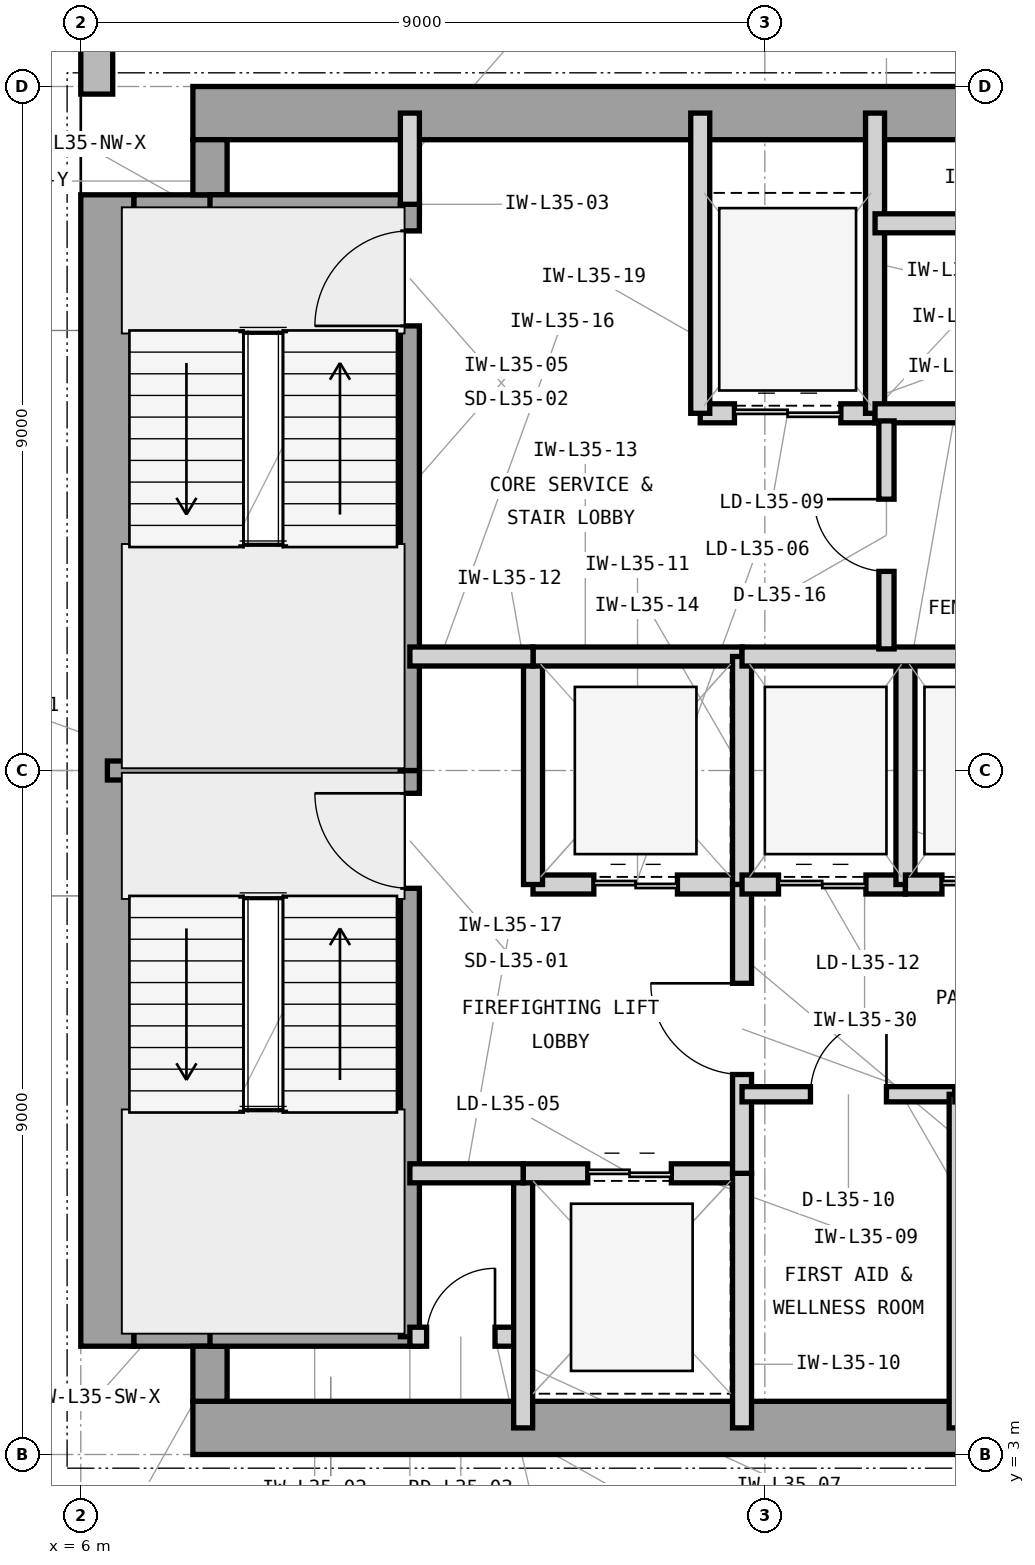
"""IFC4 building model, lengths in metres.
Left out: names, types, materials, properties, quantities, classifications, styles, units other than length and angle.
Written with IfcOpenShell. Run it as: python <this file> out.ifc"""

import sys

from ifc_helpers import new_model, si_unit, direction, frame, frame_2d, origin, place, context, subcontext, project, spatial, rectangle, extrude, element, fill, save


model = new_model("IFC4")
c1 = context("Model", 3, precision=1e-05, world=origin(), true_north=direction((0.0, 1.0)))
c2 = subcontext(c1, "Body", "Model", "MODEL_VIEW")
j1 = project(units=[si_unit("LENGTHUNIT", "METRE"), si_unit("PLANEANGLEUNIT", "RADIAN")], contexts=[c1])
p1 = place(None, origin())
s1 = spatial("IfcSite", under=j1, at=p1, CompositionType="ELEMENT")
p2 = place(p1, origin())
s2 = spatial("IfcBuilding", under=s1, at=p2, CompositionType="ELEMENT")
p3 = place(p2, frame((0.0, 0.0, 147.9)))
s3 = spatial("IfcBuildingStorey", under=s2, at=p3, CompositionType="ELEMENT", Elevation=147.9)
p4 = place(p3, frame((7.475, 3.35, 0.0), z_axis=(0.0, 0.0, 1.0), x_axis=(1.0, 0.0, 0.0)))
e1 = element("IfcWall", 1, at=p4, inside=s3, PredefinedType="SHEAR", context=c2, shape_type="SweptSolid", body=[
    extrude(rectangle(XDim=16.525, YDim=0.7, at=frame_2d((8.262, 0.0))), origin(), (0.0, 0.0, 1.0), 3.9),
])
p5 = place(p3, frame((6.35, 4.425, 0.0), z_axis=(0.0, 0.0, 1.0), x_axis=(0.0, 1.0, 0.0)))
e2 = element("IfcWall", 2, at=p5, inside=s3, PredefinedType="SHEAR", context=c2, shape_type="SweptSolid", body=[
    extrude(rectangle(XDim=15.15, YDim=0.7, at=frame_2d((7.575, 0.0))), origin(), (0.0, 0.0, 1.0), 3.9),
])
p6 = place(p3, frame((7.475, 20.65, 0.0), z_axis=(0.0, 0.0, 1.0), x_axis=(1.0, 0.0, 0.0)))
e3 = element("IfcWall", 3, at=p6, inside=s3, PredefinedType="SHEAR", context=c2, shape_type="SweptSolid", body=[
    extrude(rectangle(XDim=12.325, YDim=0.7, at=frame_2d((6.163, 0.0))), origin(), (0.0, 0.0, 1.0), 3.9),
])
p7 = place(p3, frame((6.7, 4.65, 0.0), z_axis=(0.0, 0.0, 1.0), x_axis=(1.0, 0.0, 0.0)))
e4 = element("IfcWall", 4, at=p7, inside=s3, PredefinedType="SHEAR", context=c2, shape_type="SweptSolid", body=[
    extrude(rectangle(XDim=1.225, YDim=0.45, at=frame_2d((0.613, 0.0))), origin(), (0.0, 0.0, 1.0), 3.9),
])
p8 = place(p3, frame((7.7, 3.7, 0.0), z_axis=(0.0, 0.0, 1.0), x_axis=(0.0, 1.0, 0.0)))
e5 = element("IfcWall", 5, at=p8, inside=s3, PredefinedType="SHEAR", context=c2, shape_type="SweptSolid", body=[
    extrude(rectangle(XDim=0.725, YDim=0.45, at=frame_2d((0.363, 0.0))), origin(), (0.0, 0.0, 1.0), 3.9),
])
p9 = place(p3, frame((6.7, 19.35, 0.0), z_axis=(0.0, 0.0, 1.0), x_axis=(1.0, 0.0, 0.0)))
e6 = element("IfcWall", 6, at=p9, inside=s3, PredefinedType="SHEAR", context=c2, shape_type="SweptSolid", body=[
    extrude(rectangle(XDim=1.225, YDim=0.45, at=frame_2d((0.613, 0.0))), origin(), (0.0, 0.0, 1.0), 3.9),
])
p10 = place(p3, frame((7.7, 19.575, 0.0), z_axis=(0.0, 0.0, 1.0), x_axis=(0.0, 1.0, 0.0)))
e7 = element("IfcWall", 7, at=p10, inside=s3, PredefinedType="SHEAR", context=c2, shape_type="SweptSolid", body=[
    extrude(rectangle(XDim=0.725, YDim=0.45, at=frame_2d((0.363, 0.0))), origin(), (0.0, 0.0, 1.0), 3.9),
])
p11 = place(p3, frame((6.21, 46.4, 0.0), z_axis=(0.0, 0.0, 1.0), x_axis=(0.0, -1.0, 0.0)))
e8 = element("IfcWall", 8, at=p11, inside=s3, PredefinedType="STANDARD", context=c2, shape_type="SweptSolid", body=[
    extrude(rectangle(XDim=25.5, YDim=0.42, at=frame_2d((12.75, 0.0))), origin(), (0.0, 0.0, 1.0), 3.7),
])
p12 = place(p11, frame((11.5, 0.0, 0.85)))
e9 = element("IfcOpeningElement", 9, at=p12, cuts=e8, PredefinedType="OPENING", context=c2, shape_type="SweptSolid", body=[
    extrude(rectangle(XDim=2.5, YDim=2.25, at=frame_2d((1.25, 1.125))), frame((0.0, 0.22, 0.0), z_axis=(0.0, -1.0, 0.0), x_axis=(1.0, 0.0, 0.0)), (0.0, 0.0, 1.0), 0.44),
])
p13 = place(p3, frame((6.35, 12.0, 0.0), z_axis=(0.0, 0.0, 1.0), x_axis=(1.0, 0.0, 0.0)))
e10 = element("IfcWall", 10, at=p13, inside=s3, PredefinedType="SHEAR", context=c2, shape_type="SweptSolid", body=[
    extrude(rectangle(XDim=4.105, YDim=0.25, at=frame_2d((2.052, 0.0))), origin(), (0.0, 0.0, 1.0), 3.9),
])
for number, where, z_axis, x_axis in (
    (11, (7.7, 4.55, 0.0), (0.0, 0.0, 1.0), (1.0, 0.0, 0.0)),
    (12, (7.7, 19.45, 0.0), (0.0, 0.0, 1.0), (1.0, 0.0, 0.0)),
):
    element("IfcWall", number, at=place(p3, frame(where, z_axis=z_axis, x_axis=x_axis)), inside=s3, PredefinedType="SHEAR", context=c2, shape_type="SweptSolid", body=[
        extrude(rectangle(XDim=2.755, YDim=0.25, at=frame_2d((1.377, 0.0))), origin(), (0.0, 0.0, 1.0), 3.9),
    ])
p14 = place(p3, frame((10.33, 4.55, 0.0), z_axis=(0.0, 0.0, 1.0), x_axis=(0.0, 1.0, 0.0)))
e13 = element("IfcWall", 13, at=p14, inside=s3, PredefinedType="SHEAR", context=c2, shape_type="SweptSolid", body=[
    extrude(rectangle(XDim=7.45, YDim=0.25, at=frame_2d((3.725, 0.0))), origin(), (0.0, 0.0, 1.0), 3.9),
])
p15 = place(p14, frame((5.9, 0.0, 0.0)))
e14 = element("IfcOpeningElement", 14, at=p15, cuts=e13, PredefinedType="OPENING", context=c2, shape_type="SweptSolid", body=[
    extrude(rectangle(XDim=1.25, YDim=2.2, at=frame_2d((0.625, 1.1))), frame((0.0, 0.135, 0.0), z_axis=(0.0, -1.0, 0.0), x_axis=(1.0, 0.0, 0.0)), (0.0, 0.0, 1.0), 0.27),
])
p16 = place(p3, frame((10.33, 12.0, 0.0), z_axis=(0.0, 0.0, 1.0), x_axis=(0.0, 1.0, 0.0)))
e15 = element("IfcWall", 15, at=p16, inside=s3, PredefinedType="SHEAR", context=c2, shape_type="SweptSolid", body=[
    extrude(rectangle(XDim=7.45, YDim=0.25, at=frame_2d((3.725, 0.0))), origin(), (0.0, 0.0, 1.0), 3.9),
])
p17 = place(p16, frame((5.85, 0.0, 0.0)))
e16 = element("IfcOpeningElement", 16, at=p17, cuts=e15, PredefinedType="OPENING", context=c2, shape_type="SweptSolid", body=[
    extrude(rectangle(XDim=1.25, YDim=2.2, at=frame_2d((0.625, 1.1))), frame((0.0, 0.135, 0.0), z_axis=(0.0, -1.0, 0.0), x_axis=(1.0, 0.0, 0.0)), (0.0, 0.0, 1.0), 0.27),
])
p18 = place(p3, frame((10.33, 4.55, 0.0), z_axis=(0.0, 0.0, 1.0), x_axis=(1.0, 0.0, 0.0)))
e17 = element("IfcWall", 17, at=p18, inside=s3, PredefinedType="PARTITIONING", context=c2, shape_type="SweptSolid", body=[
    extrude(rectangle(XDim=1.49, YDim=0.25, at=frame_2d((0.745, 0.0))), origin(), (0.0, 0.0, 1.0), 3.69),
])
p19 = place(p18, frame((0.22, 0.0, 0.0)))
e18 = element("IfcOpeningElement", 18, at=p19, cuts=e17, PredefinedType="OPENING", context=c2, shape_type="SweptSolid", body=[
    extrude(rectangle(XDim=0.9, YDim=2.1, at=frame_2d((0.45, 1.05))), frame((0.0, 0.135, 0.0), z_axis=(0.0, -1.0, 0.0), x_axis=(1.0, 0.0, 0.0)), (0.0, 0.0, 1.0), 0.27),
])
p20 = place(p3, frame((11.82, 3.35, 0.0), z_axis=(0.0, 0.0, 1.0), x_axis=(0.0, 1.0, 0.0)))
e19 = element("IfcWall", 19, at=p20, inside=s3, PredefinedType="PARTITIONING", context=c2, shape_type="SweptSolid", body=[
    extrude(rectangle(XDim=3.35, YDim=0.25, at=frame_2d((1.675, 0.0))), origin(), (0.0, 0.0, 1.0), 3.69),
])
p21 = place(p3, frame((10.33, 19.45, 0.0), z_axis=(0.0, 0.0, 1.0), x_axis=(0.0, 1.0, 0.0)))
e20 = element("IfcWall", 20, at=p21, inside=s3, PredefinedType="PARTITIONING", context=c2, shape_type="SweptSolid", body=[
    extrude(rectangle(XDim=1.2, YDim=0.25, at=frame_2d((0.6, 0.0))), origin(), (0.0, 0.0, 1.0), 2.994),
])
p22 = place(p3, frame((11.82, 6.7, 0.0), z_axis=(0.0, 0.0, 1.0), x_axis=(1.0, 0.0, 0.0)))
e21 = element("IfcWall", 21, at=p22, inside=s3, PredefinedType="PARTITIONING", context=c2, shape_type="SweptSolid", body=[
    extrude(rectangle(XDim=2.88, YDim=0.25, at=frame_2d((1.44, 0.0))), origin(), (0.0, 0.0, 1.0), 3.233),
])
p23 = place(p22, frame((0.85, 0.0, 0.0)))
e22 = element("IfcOpeningElement", 22, at=p23, cuts=e21, PredefinedType="OPENING", context=c2, shape_type="SweptSolid", body=[
    extrude(rectangle(XDim=1.1, YDim=2.25, at=frame_2d((0.55, 1.125))), frame((0.0, 0.135, 0.0), z_axis=(0.0, -1.0, 0.0), x_axis=(1.0, 0.0, 0.0)), (0.0, 0.0, 1.0), 0.27),
])
p24 = place(p3, frame((14.7, 3.35, 0.0), z_axis=(0.0, 0.0, 1.0), x_axis=(0.0, 1.0, 0.0)))
e23 = element("IfcWall", 23, at=p24, inside=s3, PredefinedType="PARTITIONING", context=c2, shape_type="SweptSolid", body=[
    extrude(rectangle(XDim=3.35, YDim=0.25, at=frame_2d((1.675, 0.0))), origin(), (0.0, 0.0, 1.0), 3.69),
])
p25 = place(p3, frame((11.95, 10.5, 0.0), z_axis=(0.0, 0.0, 1.0), x_axis=(1.0, 0.0, 0.0)))
e24 = element("IfcWall", 24, at=p25, inside=s3, PredefinedType="PARTITIONING", context=c2, shape_type="SweptSolid", body=[
    extrude(rectangle(XDim=2.75, YDim=0.25, at=frame_2d((1.375, 0.0))), origin(), (0.0, 0.0, 1.0), 3.233),
])
p26 = place(p25, frame((0.8, 0.0, 0.0)))
e25 = element("IfcOpeningElement", 25, at=p26, cuts=e24, PredefinedType="OPENING", context=c2, shape_type="SweptSolid", body=[
    extrude(rectangle(XDim=1.1, YDim=2.25, at=frame_2d((0.55, 1.125))), frame((0.0, 0.135, 0.0), z_axis=(0.0, -1.0, 0.0), x_axis=(1.0, 0.0, 0.0)), (0.0, 0.0, 1.0), 0.27),
])
p27 = place(p3, frame((11.95, 10.5, 0.0), z_axis=(0.0, 0.0, 1.0), x_axis=(0.0, 1.0, 0.0)))
e26 = element("IfcWall", 26, at=p27, inside=s3, PredefinedType="PARTITIONING", context=c2, shape_type="SweptSolid", body=[
    extrude(rectangle(XDim=3.0, YDim=0.25, at=frame_2d((1.5, 0.0))), origin(), (0.0, 0.0, 1.0), 3.69),
])
p28 = place(p3, frame((11.95, 13.5, 0.0), z_axis=(0.0, 0.0, 1.0), x_axis=(1.0, 0.0, 0.0)))
e27 = element("IfcWall", 27, at=p28, inside=s3, PredefinedType="PARTITIONING", context=c2, shape_type="SweptSolid", body=[
    extrude(rectangle(XDim=2.75, YDim=0.25, at=frame_2d((1.375, 0.0))), origin(), (0.0, 0.0, 1.0), 3.233),
])
p29 = place(p3, frame((14.7, 10.5, 0.0), z_axis=(0.0, 0.0, 1.0), x_axis=(0.0, 1.0, 0.0)))
e28 = element("IfcWall", 28, at=p29, inside=s3, PredefinedType="PARTITIONING", context=c2, shape_type="SweptSolid", body=[
    extrude(rectangle(XDim=3.0, YDim=0.25, at=frame_2d((1.5, 0.0))), origin(), (0.0, 0.0, 1.0), 3.69),
])
p30 = place(p3, frame((14.7, 6.7, 0.0), z_axis=(0.0, 0.0, 1.0), x_axis=(0.0, 1.0, 0.0)))
e29 = element("IfcWall", 29, at=p30, inside=s3, PredefinedType="PARTITIONING", context=c2, shape_type="SweptSolid", body=[
    extrude(rectangle(XDim=3.8, YDim=0.25, at=frame_2d((1.9, 0.0))), origin(), (0.0, 0.0, 1.0), 3.69),
])
p31 = place(p30, frame((1.3, 0.0, 0.0)))
e30 = element("IfcOpeningElement", 30, at=p31, cuts=e29, PredefinedType="OPENING", context=c2, shape_type="SweptSolid", body=[
    extrude(rectangle(XDim=1.2, YDim=2.2, at=frame_2d((0.6, 1.1))), frame((0.0, 0.135, 0.0), z_axis=(0.0, -1.0, 0.0), x_axis=(1.0, 0.0, 0.0)), (0.0, 0.0, 1.0), 0.27),
])
p32 = place(p3, frame((10.33, 13.5, 0.0), z_axis=(0.0, 0.0, 1.0), x_axis=(1.0, 0.0, 0.0)))
e31 = element("IfcWall", 31, at=p32, inside=s3, PredefinedType="PARTITIONING", context=c2, shape_type="SweptSolid", body=[
    extrude(rectangle(XDim=1.62, YDim=0.25, at=frame_2d((0.81, 0.0))), origin(), (0.0, 0.0, 1.0), 3.233),
])
p33 = place(p3, frame((10.33, 6.7, 0.0), z_axis=(0.0, 0.0, 1.0), x_axis=(1.0, 0.0, 0.0)))
e32 = element("IfcWall", 32, at=p33, inside=s3, PredefinedType="PARTITIONING", context=c2, shape_type="SweptSolid", body=[
    extrude(rectangle(XDim=1.49, YDim=0.25, at=frame_2d((0.745, 0.0))), origin(), (0.0, 0.0, 1.0), 3.233),
])
p34 = place(p3, frame((14.15, 16.7, 0.0), z_axis=(0.0, 0.0, 1.0), x_axis=(1.0, 0.0, 0.0)))
e33 = element("IfcWall", 33, at=p34, inside=s3, PredefinedType="PARTITIONING", context=c2, shape_type="SweptSolid", body=[
    extrude(rectangle(XDim=2.3, YDim=0.25, at=frame_2d((1.15, 0.0))), origin(), (0.0, 0.0, 1.0), 3.233),
])
p35 = place(p34, frame((0.45, 0.0, 0.0)))
e34 = element("IfcOpeningElement", 34, at=p35, cuts=e33, PredefinedType="OPENING", context=c2, shape_type="SweptSolid", body=[
    extrude(rectangle(XDim=1.4, YDim=2.35, at=frame_2d((0.7, 1.175))), frame((0.0, 0.135, 0.0), z_axis=(0.0, -1.0, 0.0), x_axis=(1.0, 0.0, 0.0)), (0.0, 0.0, 1.0), 0.27),
])
for number, where, z_axis, x_axis in (
    (35, (14.15, 16.7, 0.0), (0.0, 0.0, 1.0), (0.0, 1.0, 0.0)),
    (36, (16.45, 16.7, 0.0), (0.0, 0.0, 1.0), (0.0, 1.0, 0.0)),
):
    element("IfcWall", number, at=place(p3, frame(where, z_axis=z_axis, x_axis=x_axis)), inside=s3, PredefinedType="PARTITIONING", context=c2, shape_type="SweptSolid", body=[
        extrude(rectangle(XDim=3.95, YDim=0.25, at=frame_2d((1.975, 0.0))), origin(), (0.0, 0.0, 1.0), 3.69),
    ])
p36 = place(p3, frame((16.45, 16.7, 0.0), z_axis=(0.0, 0.0, 1.0), x_axis=(1.0, 0.0, 0.0)))
e37 = element("IfcWall", 37, at=p36, inside=s3, PredefinedType="PARTITIONING", context=c2, shape_type="SweptSolid", body=[
    extrude(rectangle(XDim=2.3, YDim=0.25, at=frame_2d((1.15, 0.0))), origin(), (0.0, 0.0, 1.0), 3.233),
])
p37 = place(p3, frame((16.45, 19.2, 0.0), z_axis=(0.0, 0.0, 1.0), x_axis=(1.0, 0.0, 0.0)))
e38 = element("IfcWall", 38, at=p37, inside=s3, PredefinedType="PARTITIONING", context=c2, shape_type="SweptSolid", body=[
    extrude(rectangle(XDim=7.2, YDim=0.25, at=frame_2d((3.6, 0.0))), origin(), (0.0, 0.0, 1.0), 3.69),
])
p38 = place(p3, frame((14.7, 7.74, 0.0), z_axis=(0.0, 0.0, 1.0), x_axis=(1.0, 0.0, 0.0)))
e39 = element("IfcWall", 39, at=p38, inside=s3, PredefinedType="PARTITIONING", context=c2, shape_type="SweptSolid", body=[
    extrude(rectangle(XDim=2.8, YDim=0.2, at=frame_2d((1.4, 0.0))), origin(), (0.0, 0.0, 1.0), 3.69),
])
p39 = place(p38, frame((0.9, 0.0, 0.0)))
e40 = element("IfcOpeningElement", 40, at=p39, cuts=e39, PredefinedType="OPENING", context=c2, shape_type="SweptSolid", body=[
    extrude(rectangle(XDim=1.0, YDim=2.15, at=frame_2d((0.5, 1.075))), frame((0.0, 0.11, 0.0), z_axis=(0.0, -1.0, 0.0), x_axis=(1.0, 0.0, 0.0)), (0.0, 0.0, 1.0), 0.22),
])
p40 = place(p3, frame((17.5, 3.35, 0.0), z_axis=(0.0, 0.0, 1.0), x_axis=(0.0, 1.0, 0.0)))
e41 = element("IfcWall", 41, at=p40, inside=s3, PredefinedType="PARTITIONING", context=c2, shape_type="SweptSolid", body=[
    extrude(rectangle(XDim=4.39, YDim=0.15, at=frame_2d((2.195, 0.0))), origin(), (0.0, 0.0, 1.0), 3.69),
])
p41 = place(p3, frame((14.7, 10.5, 0.0), z_axis=(0.0, 0.0, 1.0), x_axis=(1.0, 0.0, 0.0)))
e42 = element("IfcWall", 42, at=p41, inside=s3, PredefinedType="PARTITIONING", context=c2, shape_type="SweptSolid", body=[
    extrude(rectangle(XDim=2.15, YDim=0.25, at=frame_2d((1.075, 0.0))), origin(), (0.0, 0.0, 1.0), 3.233),
])
p42 = place(p41, frame((0.48, 0.0, 0.0)))
e43 = element("IfcOpeningElement", 43, at=p42, cuts=e42, PredefinedType="OPENING", context=c2, shape_type="SweptSolid", body=[
    extrude(rectangle(XDim=1.15, YDim=2.25, at=frame_2d((0.575, 1.125))), frame((0.0, 0.135, 0.0), z_axis=(0.0, -1.0, 0.0), x_axis=(1.0, 0.0, 0.0)), (0.0, 0.0, 1.0), 0.27),
])
p43 = place(p3, frame((16.85, 10.5, 0.0), z_axis=(0.0, 0.0, 1.0), x_axis=(0.0, 1.0, 0.0)))
e44 = element("IfcWall", 44, at=p43, inside=s3, PredefinedType="PARTITIONING", context=c2, shape_type="SweptSolid", body=[
    extrude(rectangle(XDim=3.0, YDim=0.25, at=frame_2d((1.5, 0.0))), origin(), (0.0, 0.0, 1.0), 3.69),
])
p44 = place(p3, frame((16.85, 10.5, 0.0), z_axis=(0.0, 0.0, 1.0), x_axis=(1.0, 0.0, 0.0)))
e45 = element("IfcWall", 45, at=p44, inside=s3, PredefinedType="PARTITIONING", context=c2, shape_type="SweptSolid", body=[
    extrude(rectangle(XDim=2.1, YDim=0.25, at=frame_2d((1.05, 0.0))), origin(), (0.0, 0.0, 1.0), 3.233),
])
p45 = place(p44, frame((0.48, 0.0, 0.0)))
e46 = element("IfcOpeningElement", 46, at=p45, cuts=e45, PredefinedType="OPENING", context=c2, shape_type="SweptSolid", body=[
    extrude(rectangle(XDim=1.15, YDim=2.25, at=frame_2d((0.575, 1.125))), frame((0.0, 0.135, 0.0), z_axis=(0.0, -1.0, 0.0), x_axis=(1.0, 0.0, 0.0)), (0.0, 0.0, 1.0), 0.27),
])
p46 = place(p3, frame((14.7, 13.5, 0.0), z_axis=(0.0, 0.0, 1.0), x_axis=(1.0, 0.0, 0.0)))
e47 = element("IfcWall", 47, at=p46, inside=s3, PredefinedType="PARTITIONING", context=c2, shape_type="SweptSolid", body=[
    extrude(rectangle(XDim=8.95, YDim=0.25, at=frame_2d((4.475, 0.0))), origin(), (0.0, 0.0, 1.0), 3.233),
])
p47 = place(p3, frame((16.6, 13.6, 0.0), z_axis=(0.0, 0.0, 1.0), x_axis=(0.0, 1.0, 0.0)))
e48 = element("IfcWall", 48, at=p47, inside=s3, PredefinedType="PARTITIONING", context=c2, shape_type="SweptSolid", body=[
    extrude(rectangle(XDim=3.0, YDim=0.2, at=frame_2d((1.5, 0.0))), origin(), (0.0, 0.0, 1.0), 3.69),
])
p48 = place(p47, frame((1.02, 0.0, 0.0)))
e49 = element("IfcOpeningElement", 49, at=p48, cuts=e48, PredefinedType="OPENING", context=c2, shape_type="SweptSolid", body=[
    extrude(rectangle(XDim=0.95, YDim=2.1, at=frame_2d((0.475, 1.05))), frame((0.0, 0.11, 0.0), z_axis=(0.0, -1.0, 0.0), x_axis=(1.0, 0.0, 0.0)), (0.0, 0.0, 1.0), 0.22),
])
p49 = place(p15, origin())
e50 = element("IfcDoor", 50, at=p49, inside=s3, OperationType="SINGLE_SWING_RIGHT", PredefinedType="DOOR", context=c2, shape_type="SweptSolid", body=[
    extrude(rectangle(XDim=1.25, YDim=2.2, at=frame_2d((0.625, 1.1))), frame((0.0, 0.025, 0.0), z_axis=(0.0, -1.0, 0.0), x_axis=(1.0, 0.0, 0.0)), (0.0, 0.0, 1.0), 0.05),
])
fill(e14, e50)
p50 = place(p17, origin())
e51 = element("IfcDoor", 51, at=p50, inside=s3, OperationType="SINGLE_SWING_LEFT", PredefinedType="DOOR", context=c2, shape_type="SweptSolid", body=[
    extrude(rectangle(XDim=1.25, YDim=2.2, at=frame_2d((0.625, 1.1))), frame((0.0, 0.025, 0.0), z_axis=(0.0, -1.0, 0.0), x_axis=(1.0, 0.0, 0.0)), (0.0, 0.0, 1.0), 0.05),
])
fill(e16, e51)
p51 = place(p19, origin())
e52 = element("IfcDoor", 52, at=p51, inside=s3, OperationType="SINGLE_SWING_RIGHT", PredefinedType="TRAPDOOR", context=c2, shape_type="SweptSolid", body=[
    extrude(rectangle(XDim=0.9, YDim=2.1, at=frame_2d((0.45, 1.05))), frame((0.0, 0.025, 0.0), z_axis=(0.0, -1.0, 0.0), x_axis=(1.0, 0.0, 0.0)), (0.0, 0.0, 1.0), 0.05),
])
fill(e18, e52)
p52 = place(p23, origin())
e53 = element("IfcDoor", 53, at=p52, inside=s3, OperationType="DOUBLE_DOOR_SLIDING", PredefinedType="DOOR", context=c2, shape_type="SweptSolid", body=[
    extrude(rectangle(XDim=1.1, YDim=2.25, at=frame_2d((0.55, 1.125))), frame((0.0, 0.025, 0.0), z_axis=(0.0, -1.0, 0.0), x_axis=(1.0, 0.0, 0.0)), (0.0, 0.0, 1.0), 0.05),
])
fill(e22, e53)
p53 = place(p26, origin())
e54 = element("IfcDoor", 54, at=p53, inside=s3, OperationType="DOUBLE_DOOR_SLIDING", PredefinedType="DOOR", context=c2, shape_type="SweptSolid", body=[
    extrude(rectangle(XDim=1.1, YDim=2.25, at=frame_2d((0.55, 1.125))), frame((0.0, 0.025, 0.0), z_axis=(0.0, -1.0, 0.0), x_axis=(1.0, 0.0, 0.0)), (0.0, 0.0, 1.0), 0.05),
])
fill(e25, e54)
p54 = place(p31, origin())
e55 = element("IfcDoor", 55, at=p54, inside=s3, OperationType="SINGLE_SWING_RIGHT", PredefinedType="DOOR", context=c2, shape_type="SweptSolid", body=[
    extrude(rectangle(XDim=1.2, YDim=2.2, at=frame_2d((0.6, 1.1))), frame((0.0, 0.025, 0.0), z_axis=(0.0, -1.0, 0.0), x_axis=(1.0, 0.0, 0.0)), (0.0, 0.0, 1.0), 0.05),
])
fill(e30, e55)
p55 = place(p35, origin())
e56 = element("IfcDoor", 56, at=p55, inside=s3, OperationType="DOUBLE_DOOR_SLIDING", PredefinedType="DOOR", context=c2, shape_type="SweptSolid", body=[
    extrude(rectangle(XDim=1.4, YDim=2.35, at=frame_2d((0.7, 1.175))), frame((0.0, 0.025, 0.0), z_axis=(0.0, -1.0, 0.0), x_axis=(1.0, 0.0, 0.0)), (0.0, 0.0, 1.0), 0.05),
])
fill(e34, e56)
p56 = place(p39, origin())
e57 = element("IfcDoor", 57, at=p56, inside=s3, OperationType="SINGLE_SWING_RIGHT", PredefinedType="DOOR", context=c2, shape_type="SweptSolid", body=[
    extrude(rectangle(XDim=1.0, YDim=2.15, at=frame_2d((0.5, 1.075))), frame((0.0, 0.025, 0.0), z_axis=(0.0, -1.0, 0.0), x_axis=(1.0, 0.0, 0.0)), (0.0, 0.0, 1.0), 0.05),
])
fill(e40, e57)
p57 = place(p42, origin())
e58 = element("IfcDoor", 58, at=p57, inside=s3, OperationType="DOUBLE_DOOR_SLIDING", PredefinedType="DOOR", context=c2, shape_type="SweptSolid", body=[
    extrude(rectangle(XDim=1.15, YDim=2.25, at=frame_2d((0.575, 1.125))), frame((0.0, 0.025, 0.0), z_axis=(0.0, -1.0, 0.0), x_axis=(1.0, 0.0, 0.0)), (0.0, 0.0, 1.0), 0.05),
])
fill(e43, e58)
p58 = place(p45, origin())
e59 = element("IfcDoor", 59, at=p58, inside=s3, OperationType="DOUBLE_DOOR_SLIDING", PredefinedType="DOOR", context=c2, shape_type="SweptSolid", body=[
    extrude(rectangle(XDim=1.15, YDim=2.25, at=frame_2d((0.575, 1.125))), frame((0.0, 0.025, 0.0), z_axis=(0.0, -1.0, 0.0), x_axis=(1.0, 0.0, 0.0)), (0.0, 0.0, 1.0), 0.05),
])
fill(e46, e59)
p59 = place(p48, origin())
e60 = element("IfcDoor", 60, at=p59, inside=s3, OperationType="SINGLE_SWING_RIGHT", PredefinedType="DOOR", context=c2, shape_type="SweptSolid", body=[
    extrude(rectangle(XDim=0.95, YDim=2.1, at=frame_2d((0.475, 1.05))), frame((0.0, 0.025, 0.0), z_axis=(0.0, -1.0, 0.0), x_axis=(1.0, 0.0, 0.0)), (0.0, 0.0, 1.0), 0.05),
])
fill(e49, e60)
save(model, sys.argv[1])
